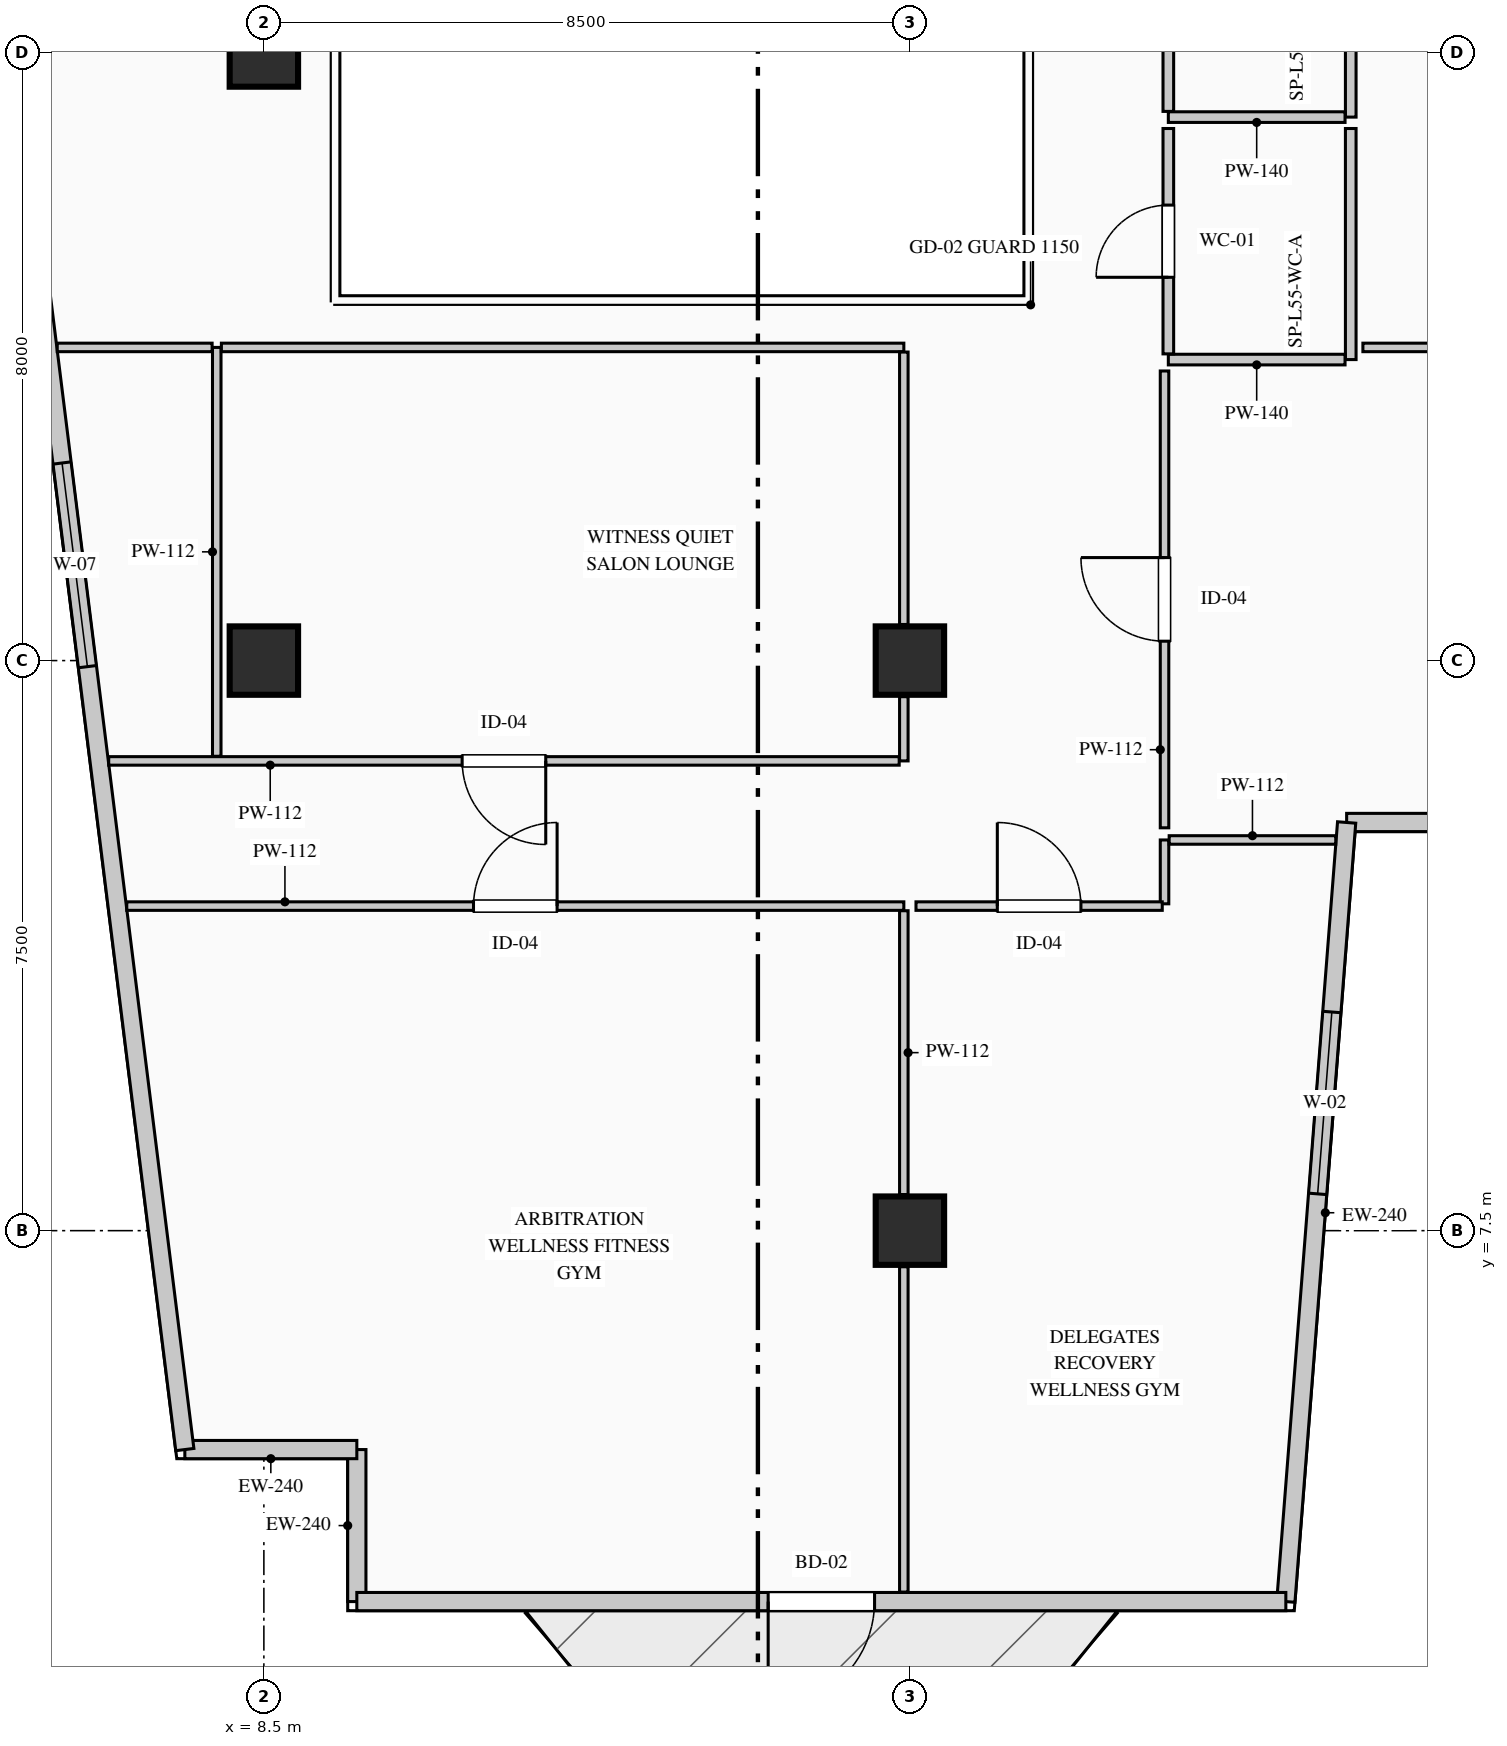
"""IFC4 building model, lengths in metres.
Left out: names, types, materials, properties, quantities, classifications, styles, units other than length and angle.
Written with IfcOpenShell. Run it as: python <this file> out.ifc"""

import sys

from ifc_helpers import new_model, si_unit, direction, frame, frame_2d, origin, origin_2d, place, context, subcontext, project, spatial, rectangle, extrude, element, fill, save


model = new_model("IFC4")
c1 = context("Model", 3, precision=1e-05, world=origin(), true_north=direction((0.0, 1.0)))
c2 = subcontext(c1, "Body", "Model", "MODEL_VIEW")
j1 = project(units=[si_unit("LENGTHUNIT", "METRE"), si_unit("PLANEANGLEUNIT", "RADIAN")], contexts=[c1])
p1 = place(None, origin())
s1 = spatial("IfcSite", under=j1, at=p1, CompositionType="ELEMENT")
p2 = place(p1, origin())
s2 = spatial("IfcBuilding", under=s1, at=p2, CompositionType="ELEMENT")
p3 = place(p2, frame((0.0, 0.0, 231.15)))
s3 = spatial("IfcBuildingStorey", under=s2, at=p3, CompositionType="ELEMENT", Elevation=231.15)
for number, where, z_axis, x_axis in (
    (1, (8.5, 15.0, 0.0), (0.0, 0.0, 1.0), (1.0, 0.0, 0.0)),
    (2, (8.5, 23.0, 0.0), (0.0, 0.0, 1.0), (1.0, 0.0, 0.0)),
    (3, (17.0, 7.5, 0.0), (0.0, 0.0, 1.0), (1.0, 0.0, 0.0)),
    (4, (17.0, 15.0, 0.0), (0.0, 0.0, 1.0), (1.0, 0.0, 0.0)),
):
    element("IfcColumn", number, at=place(p3, frame(where, z_axis=z_axis, x_axis=x_axis)), inside=s3, PredefinedType="COLUMN", context=c2, shape_type="SweptSolid", body=[
        extrude(rectangle(XDim=0.9, YDim=0.9, at=origin_2d()), origin(), (0.0, 0.0, 1.0), 3.95),
    ])
p4 = place(p3, frame((9.723, 2.62, 0.0), z_axis=(0.0, 0.0, 1.0), x_axis=(0.0, 1.0, 0.0)))
e5 = element("IfcWall", 5, at=p4, inside=s3, PredefinedType="STANDARD", context=c2, shape_type="SweptSolid", body=[
    extrude(rectangle(XDim=2.0, YDim=0.24, at=frame_2d((1.0, 0.0))), origin(), (0.0, 0.0, 1.0), 3.7),
])
p5 = place(p3, frame((9.723, 4.62, 0.0), z_axis=(0.0, 0.0, 1.0), x_axis=(-1.0, 0.0, 0.0)))
e6 = element("IfcWall", 6, at=p5, inside=s3, PredefinedType="STANDARD", context=c2, shape_type="SweptSolid", body=[
    extrude(rectangle(XDim=2.263, YDim=0.24, at=frame_2d((1.131, 0.0))), origin(), (0.0, 0.0, 1.0), 3.7),
])
p6 = place(p3, frame((7.46, 4.62, 0.0), z_axis=(0.0, 0.0, 1.0), x_axis=(-0.123515576323, 0.992342633573, 0.0)))
e7 = element("IfcWall", 7, at=p6, inside=s3, PredefinedType="STANDARD", context=c2, shape_type="SweptSolid", body=[
    extrude(rectangle(XDim=37.043, YDim=0.24, at=frame_2d((18.522, 0.0))), origin(), (0.0, 0.0, 1.0), 3.7),
])
p7 = place(p6, frame((10.379, 0.0, 0.9)))
e8 = element("IfcOpeningElement", 8, at=p7, cuts=e7, PredefinedType="OPENING", context=c2, shape_type="SweptSolid", body=[
    extrude(rectangle(XDim=2.7, YDim=2.1, at=frame_2d((1.35, 1.05))), frame((0.0, 0.13, 0.0), z_axis=(0.0, -1.0, 0.0), x_axis=(1.0, 0.0, 0.0)), (0.0, 0.0, 1.0), 0.26),
])
p8 = place(p3, frame((29.581, 12.87, 0.0), z_axis=(0.0, 0.0, 1.0), x_axis=(-1.0, 0.0, 0.0)))
e9 = element("IfcWall", 9, at=p8, inside=s3, PredefinedType="STANDARD", context=c2, shape_type="SweptSolid", body=[
    extrude(rectangle(XDim=6.834, YDim=0.24, at=frame_2d((3.417, 0.0))), origin(), (0.0, 0.0, 1.0), 3.7),
])
p9 = place(p8, frame((1.26, 0.0, 0.9)))
e10 = element("IfcOpeningElement", 10, at=p9, cuts=e9, PredefinedType="OPENING", context=c2, shape_type="SweptSolid", body=[
    extrude(rectangle(XDim=2.4, YDim=2.1, at=frame_2d((1.2, 1.05))), frame((0.0, 0.13, 0.0), z_axis=(0.0, -1.0, 0.0), x_axis=(1.0, 0.0, 0.0)), (0.0, 0.0, 1.0), 0.26),
])
p10 = place(p3, frame((22.746, 12.87, 0.0), z_axis=(0.0, 0.0, 1.0), x_axis=(-0.077816860153, -0.996967670627, 0.0)))
e11 = element("IfcWall", 11, at=p10, inside=s3, PredefinedType="STANDARD", context=c2, shape_type="SweptSolid", body=[
    extrude(rectangle(XDim=10.281, YDim=0.24, at=frame_2d((5.141, 0.0))), origin(), (0.0, 0.0, 1.0), 3.7),
])
p11 = place(p10, frame((2.501, 0.0, 0.9)))
e12 = element("IfcOpeningElement", 12, at=p11, cuts=e11, PredefinedType="OPENING", context=c2, shape_type="SweptSolid", body=[
    extrude(rectangle(XDim=2.4, YDim=2.1, at=frame_2d((1.2, 1.05))), frame((0.0, 0.13, 0.0), z_axis=(0.0, -1.0, 0.0), x_axis=(1.0, 0.0, 0.0)), (0.0, 0.0, 1.0), 0.26),
])
p12 = place(p3, frame((21.946, 2.62, 0.0), z_axis=(0.0, 0.0, 1.0), x_axis=(-1.0, 0.0, 0.0)))
e13 = element("IfcWall", 13, at=p12, inside=s3, PredefinedType="STANDARD", context=c2, shape_type="SweptSolid", body=[
    extrude(rectangle(XDim=12.223, YDim=0.24, at=frame_2d((6.112, 0.0))), origin(), (0.0, 0.0, 1.0), 3.7),
])
p13 = place(p12, frame((5.411, 0.0, 0.0)))
e14 = element("IfcOpeningElement", 14, at=p13, cuts=e13, PredefinedType="OPENING", context=c2, shape_type="SweptSolid", body=[
    extrude(rectangle(XDim=1.4, YDim=2.2, at=frame_2d((0.7, 1.1))), frame((0.0, 0.13, 0.0), z_axis=(0.0, -1.0, 0.0), x_axis=(1.0, 0.0, 0.0)), (0.0, 0.0, 1.0), 0.26),
])
p14 = place(p3, frame((22.8, 25.15, 0.0), z_axis=(0.0, 0.0, 1.0), x_axis=(0.0, -1.0, 0.0)))
e15 = element("IfcWall", 15, at=p14, inside=s3, PredefinedType="PARTITIONING", context=c2, shape_type="SweptSolid", body=[
    extrude(rectangle(XDim=3.0, YDim=0.14, at=frame_2d((1.5, 0.0))), origin(), (0.0, 0.0, 1.0), 3.285),
])
p15 = place(p3, frame((22.725, 22.15, 0.0), z_axis=(0.0, 0.0, 1.0), x_axis=(-1.0, 0.0, 0.0)))
e16 = element("IfcWall", 16, at=p15, inside=s3, PredefinedType="PARTITIONING", context=c2, shape_type="SweptSolid", body=[
    extrude(rectangle(XDim=2.325, YDim=0.14, at=frame_2d((1.163, 0.0))), origin(), (0.0, 0.0, 1.0), 3.7),
])
p16 = place(p3, frame((20.4, 22.225, 0.0), z_axis=(0.0, 0.0, 1.0), x_axis=(0.0, 1.0, 0.0)))
e17 = element("IfcWall", 17, at=p16, inside=s3, PredefinedType="PARTITIONING", context=c2, shape_type="SweptSolid", body=[
    extrude(rectangle(XDim=2.925, YDim=0.14, at=frame_2d((1.462, 0.0))), origin(), (0.0, 0.0, 1.0), 3.7),
])
p17 = place(p16, frame((0.988, 0.0, 0.0)))
e18 = element("IfcOpeningElement", 18, at=p17, cuts=e17, PredefinedType="OPENING", context=c2, shape_type="SweptSolid", body=[
    extrude(rectangle(XDim=0.95, YDim=2.15, at=frame_2d((0.475, 1.075))), frame((0.0, 0.08, 0.0), z_axis=(0.0, -1.0, 0.0), x_axis=(1.0, 0.0, 0.0)), (0.0, 0.0, 1.0), 0.16),
])
p18 = place(p3, frame((22.8, 22.0, 0.0), z_axis=(0.0, 0.0, 1.0), x_axis=(0.0, -1.0, 0.0)))
e19 = element("IfcWall", 19, at=p18, inside=s3, PredefinedType="PARTITIONING", context=c2, shape_type="SweptSolid", body=[
    extrude(rectangle(XDim=3.04, YDim=0.14, at=frame_2d((1.52, 0.0))), origin(), (0.0, 0.0, 1.0), 3.285),
])
p19 = place(p3, frame((22.725, 18.96, 0.0), z_axis=(0.0, 0.0, 1.0), x_axis=(-1.0, 0.0, 0.0)))
e20 = element("IfcWall", 20, at=p19, inside=s3, PredefinedType="PARTITIONING", context=c2, shape_type="SweptSolid", body=[
    extrude(rectangle(XDim=2.325, YDim=0.14, at=frame_2d((1.163, 0.0))), origin(), (0.0, 0.0, 1.0), 3.7),
])
p20 = place(p3, frame((20.4, 19.035, 0.0), z_axis=(0.0, 0.0, 1.0), x_axis=(0.0, 1.0, 0.0)))
e21 = element("IfcWall", 21, at=p20, inside=s3, PredefinedType="PARTITIONING", context=c2, shape_type="SweptSolid", body=[
    extrude(rectangle(XDim=2.965, YDim=0.14, at=frame_2d((1.482, 0.0))), origin(), (0.0, 0.0, 1.0), 3.7),
])
p21 = place(p20, frame((1.008, 0.0, 0.0)))
e22 = element("IfcOpeningElement", 22, at=p21, cuts=e21, PredefinedType="OPENING", context=c2, shape_type="SweptSolid", body=[
    extrude(rectangle(XDim=0.95, YDim=2.15, at=frame_2d((0.475, 1.075))), frame((0.0, 0.08, 0.0), z_axis=(0.0, -1.0, 0.0), x_axis=(1.0, 0.0, 0.0)), (0.0, 0.0, 1.0), 0.16),
])
p22 = place(p3, frame((6.696, 11.77, 0.0), z_axis=(0.0, 0.0, 1.0), x_axis=(1.0, 0.0, 0.0)))
e23 = element("IfcWall", 23, at=p22, inside=s3, PredefinedType="PARTITIONING", context=c2, shape_type="SweptSolid", body=[
    extrude(rectangle(XDim=10.224, YDim=0.112, at=frame_2d((5.112, 0.0))), origin(), (0.0, 0.0, 1.0), 3.7),
])
p23 = place(p22, frame((4.562, 0.0, 0.0)))
e24 = element("IfcOpeningElement", 24, at=p23, cuts=e23, PredefinedType="OPENING", context=c2, shape_type="SweptSolid", body=[
    extrude(rectangle(XDim=1.1, YDim=2.2, at=frame_2d((0.55, 1.1))), frame((0.0, 0.066, 0.0), z_axis=(0.0, -1.0, 0.0), x_axis=(1.0, 0.0, 0.0)), (0.0, 0.0, 1.0), 0.132),
])
p24 = place(p3, frame((16.92, 11.709, 0.0), z_axis=(0.0, 0.0, 1.0), x_axis=(0.0, -1.0, 0.0)))
e25 = element("IfcWall", 25, at=p24, inside=s3, PredefinedType="PARTITIONING", context=c2, shape_type="SweptSolid", body=[
    extrude(rectangle(XDim=3.734, YDim=0.112, at=frame_2d((1.867, 0.0))), origin(), (0.0, 0.0, 1.0), 3.185),
])
p25 = place(p3, frame((16.92, 7.025, 0.0), z_axis=(0.0, 0.0, 1.0), x_axis=(0.0, -1.0, 0.0)))
e26 = element("IfcWall", 26, at=p25, inside=s3, PredefinedType="PARTITIONING", context=c2, shape_type="SweptSolid", body=[
    extrude(rectangle(XDim=4.28, YDim=0.112, at=frame_2d((2.14, 0.0))), origin(), (0.0, 0.0, 1.0), 3.7),
])
p26 = place(p3, frame((20.35, 11.8, 0.0), z_axis=(0.0, 0.0, 1.0), x_axis=(0.0, 1.0, 0.0)))
e27 = element("IfcWall", 27, at=p26, inside=s3, PredefinedType="PARTITIONING", context=c2, shape_type="SweptSolid", body=[
    extrude(rectangle(XDim=0.84, YDim=0.112, at=frame_2d((0.42, 0.0))), origin(), (0.0, 0.0, 1.0), 3.7),
])
p27 = place(p3, frame((20.411, 12.64, 0.0), z_axis=(0.0, 0.0, 1.0), x_axis=(1.0, 0.0, 0.0)))
e28 = element("IfcWall", 28, at=p27, inside=s3, PredefinedType="PARTITIONING", context=c2, shape_type="SweptSolid", body=[
    extrude(rectangle(XDim=2.192, YDim=0.112, at=frame_2d((1.096, 0.0))), origin(), (0.0, 0.0, 1.0), 3.7),
])
p28 = place(p3, frame((17.08, 11.77, 0.0), z_axis=(0.0, 0.0, 1.0), x_axis=(1.0, 0.0, 0.0)))
e29 = element("IfcWall", 29, at=p28, inside=s3, PredefinedType="PARTITIONING", context=c2, shape_type="SweptSolid", body=[
    extrude(rectangle(XDim=3.24, YDim=0.112, at=frame_2d((1.62, 0.0))), origin(), (0.0, 0.0, 1.0), 3.7),
])
p29 = place(p28, frame((1.07, 0.0, 0.0)))
e30 = element("IfcOpeningElement", 30, at=p29, cuts=e29, PredefinedType="OPENING", context=c2, shape_type="SweptSolid", body=[
    extrude(rectangle(XDim=1.1, YDim=2.2, at=frame_2d((0.55, 1.1))), frame((0.0, 0.066, 0.0), z_axis=(0.0, -1.0, 0.0), x_axis=(1.0, 0.0, 0.0)), (0.0, 0.0, 1.0), 0.132),
])
p30 = place(p3, frame((20.35, 12.8, 0.0), z_axis=(0.0, 0.0, 1.0), x_axis=(0.0, 1.0, 0.0)))
e31 = element("IfcWall", 31, at=p30, inside=s3, PredefinedType="PARTITIONING", context=c2, shape_type="SweptSolid", body=[
    extrude(rectangle(XDim=6.01, YDim=0.112, at=frame_2d((3.005, 0.0))), origin(), (0.0, 0.0, 1.0), 3.7),
])
p31 = place(p30, frame((2.455, 0.0, 0.0)))
e32 = element("IfcOpeningElement", 32, at=p31, cuts=e31, PredefinedType="OPENING", context=c2, shape_type="SweptSolid", body=[
    extrude(rectangle(XDim=1.1, YDim=2.2, at=frame_2d((0.55, 1.1))), frame((0.0, 0.066, 0.0), z_axis=(0.0, -1.0, 0.0), x_axis=(1.0, 0.0, 0.0)), (0.0, 0.0, 1.0), 0.132),
])
p32 = place(p3, frame((22.96, 19.12, 0.0), z_axis=(0.0, 0.0, 1.0), x_axis=(1.0, 0.0, 0.0)))
e33 = element("IfcWall", 33, at=p32, inside=s3, PredefinedType="PARTITIONING", context=c2, shape_type="SweptSolid", body=[
    extrude(rectangle(XDim=20.121, YDim=0.112, at=frame_2d((10.061, 0.0))), origin(), (0.0, 0.0, 1.0), 3.7),
])
p33 = place(p3, frame((16.92, 14.525, 0.0), z_axis=(0.0, 0.0, 1.0), x_axis=(0.0, -1.0, 0.0)))
e34 = element("IfcWall", 34, at=p33, inside=s3, PredefinedType="PARTITIONING", context=c2, shape_type="SweptSolid", body=[
    extrude(rectangle(XDim=0.845, YDim=0.112, at=frame_2d((0.422, 0.0))), origin(), (0.0, 0.0, 1.0), 3.185),
])
p34 = place(p3, frame((16.859, 13.68, 0.0), z_axis=(0.0, 0.0, 1.0), x_axis=(-1.0, 0.0, 0.0)))
e35 = element("IfcWall", 35, at=p34, inside=s3, PredefinedType="PARTITIONING", context=c2, shape_type="SweptSolid", body=[
    extrude(rectangle(XDim=10.4, YDim=0.112, at=frame_2d((5.2, 0.0))), origin(), (0.0, 0.0, 1.0), 3.7),
])
p35 = place(p34, frame((4.65, 0.0, 0.0)))
e36 = element("IfcOpeningElement", 36, at=p35, cuts=e35, PredefinedType="OPENING", context=c2, shape_type="SweptSolid", body=[
    extrude(rectangle(XDim=1.1, YDim=2.2, at=frame_2d((0.55, 1.1))), frame((0.0, 0.066, 0.0), z_axis=(0.0, -1.0, 0.0), x_axis=(1.0, 0.0, 0.0)), (0.0, 0.0, 1.0), 0.132),
])
p36 = place(p3, frame((7.88, 13.741, 0.0), z_axis=(0.0, 0.0, 1.0), x_axis=(0.0, 1.0, 0.0)))
e37 = element("IfcWall", 37, at=p36, inside=s3, PredefinedType="PARTITIONING", context=c2, shape_type="SweptSolid", body=[
    extrude(rectangle(XDim=5.379, YDim=0.112, at=frame_2d((2.689, 0.0))), origin(), (0.0, 0.0, 1.0), 3.7),
])
p37 = place(p3, frame((5.781, 19.12, 0.0), z_axis=(0.0, 0.0, 1.0), x_axis=(1.0, 0.0, 0.0)))
e38 = element("IfcWall", 38, at=p37, inside=s3, PredefinedType="PARTITIONING", context=c2, shape_type="SweptSolid", body=[
    extrude(rectangle(XDim=2.038, YDim=0.112, at=frame_2d((1.019, 0.0))), origin(), (0.0, 0.0, 1.0), 3.7),
])
p38 = place(p3, frame((7.941, 19.12, 0.0), z_axis=(0.0, 0.0, 1.0), x_axis=(1.0, 0.0, 0.0)))
e39 = element("IfcWall", 39, at=p38, inside=s3, PredefinedType="PARTITIONING", context=c2, shape_type="SweptSolid", body=[
    extrude(rectangle(XDim=8.979, YDim=0.112, at=frame_2d((4.49, 0.0))), origin(), (0.0, 0.0, 1.0), 3.7),
])
p39 = place(p3, frame((16.92, 19.059, 0.0), z_axis=(0.0, 0.0, 1.0), x_axis=(0.0, -1.0, 0.0)))
e40 = element("IfcWall", 40, at=p39, inside=s3, PredefinedType="PARTITIONING", context=c2, shape_type="SweptSolid", body=[
    extrude(rectangle(XDim=3.584, YDim=0.112, at=frame_2d((1.792, 0.0))), origin(), (0.0, 0.0, 1.0), 3.7),
])
p40 = place(p7, origin())
e41 = element("IfcWindow", 41, at=p40, inside=s3, PartitioningType="DOUBLE_PANEL_VERTICAL", PredefinedType="WINDOW", context=c2, shape_type="SweptSolid", body=[
    extrude(rectangle(XDim=2.7, YDim=2.1, at=frame_2d((1.35, 1.05))), frame((0.0, 0.03, 0.0), z_axis=(0.0, -1.0, 0.0), x_axis=(1.0, 0.0, 0.0)), (0.0, 0.0, 1.0), 0.06),
])
fill(e8, e41)
p41 = place(p11, origin())
e42 = element("IfcWindow", 42, at=p41, inside=s3, PartitioningType="DOUBLE_PANEL_VERTICAL", PredefinedType="WINDOW", context=c2, shape_type="SweptSolid", body=[
    extrude(rectangle(XDim=2.4, YDim=2.1, at=frame_2d((1.2, 1.05))), frame((0.0, 0.03, 0.0), z_axis=(0.0, -1.0, 0.0), x_axis=(1.0, 0.0, 0.0)), (0.0, 0.0, 1.0), 0.06),
])
fill(e12, e42)
p42 = place(p13, origin())
e43 = element("IfcDoor", 43, at=p42, inside=s3, OperationType="SINGLE_SWING_RIGHT", PredefinedType="DOOR", context=c2, shape_type="SweptSolid", body=[
    extrude(rectangle(XDim=1.4, YDim=2.2, at=frame_2d((0.7, 1.1))), frame((0.0, 0.025, 0.0), z_axis=(0.0, -1.0, 0.0), x_axis=(1.0, 0.0, 0.0)), (0.0, 0.0, 1.0), 0.05),
])
fill(e14, e43)
p43 = place(p21, origin())
e44 = element("IfcDoor", 44, at=p43, inside=s3, OperationType="SINGLE_SWING_LEFT", PredefinedType="DOOR", context=c2, shape_type="SweptSolid", body=[
    extrude(rectangle(XDim=0.95, YDim=2.15, at=frame_2d((0.475, 1.075))), frame((0.0, 0.025, 0.0), z_axis=(0.0, -1.0, 0.0), x_axis=(1.0, 0.0, 0.0)), (0.0, 0.0, 1.0), 0.05),
])
fill(e22, e44)
p44 = place(p23, origin())
e45 = element("IfcDoor", 45, at=p44, inside=s3, OperationType="SINGLE_SWING_RIGHT", PredefinedType="DOOR", context=c2, shape_type="SweptSolid", body=[
    extrude(rectangle(XDim=1.1, YDim=2.2, at=frame_2d((0.55, 1.1))), frame((0.0, 0.025, 0.0), z_axis=(0.0, -1.0, 0.0), x_axis=(1.0, 0.0, 0.0)), (0.0, 0.0, 1.0), 0.05),
])
fill(e24, e45)
p45 = place(p29, origin())
e46 = element("IfcDoor", 46, at=p45, inside=s3, OperationType="SINGLE_SWING_LEFT", PredefinedType="DOOR", context=c2, shape_type="SweptSolid", body=[
    extrude(rectangle(XDim=1.1, YDim=2.2, at=frame_2d((0.55, 1.1))), frame((0.0, 0.025, 0.0), z_axis=(0.0, -1.0, 0.0), x_axis=(1.0, 0.0, 0.0)), (0.0, 0.0, 1.0), 0.05),
])
fill(e30, e46)
p46 = place(p31, origin())
e47 = element("IfcDoor", 47, at=p46, inside=s3, OperationType="SINGLE_SWING_RIGHT", PredefinedType="DOOR", context=c2, shape_type="SweptSolid", body=[
    extrude(rectangle(XDim=1.1, YDim=2.2, at=frame_2d((0.55, 1.1))), frame((0.0, 0.025, 0.0), z_axis=(0.0, -1.0, 0.0), x_axis=(1.0, 0.0, 0.0)), (0.0, 0.0, 1.0), 0.05),
])
fill(e32, e47)
p47 = place(p35, origin())
e48 = element("IfcDoor", 48, at=p47, inside=s3, OperationType="SINGLE_SWING_LEFT", PredefinedType="DOOR", context=c2, shape_type="SweptSolid", body=[
    extrude(rectangle(XDim=1.1, YDim=2.2, at=frame_2d((0.55, 1.1))), frame((0.0, 0.025, 0.0), z_axis=(0.0, -1.0, 0.0), x_axis=(1.0, 0.0, 0.0)), (0.0, 0.0, 1.0), 0.05),
])
fill(e36, e48)
save(model, sys.argv[1])
